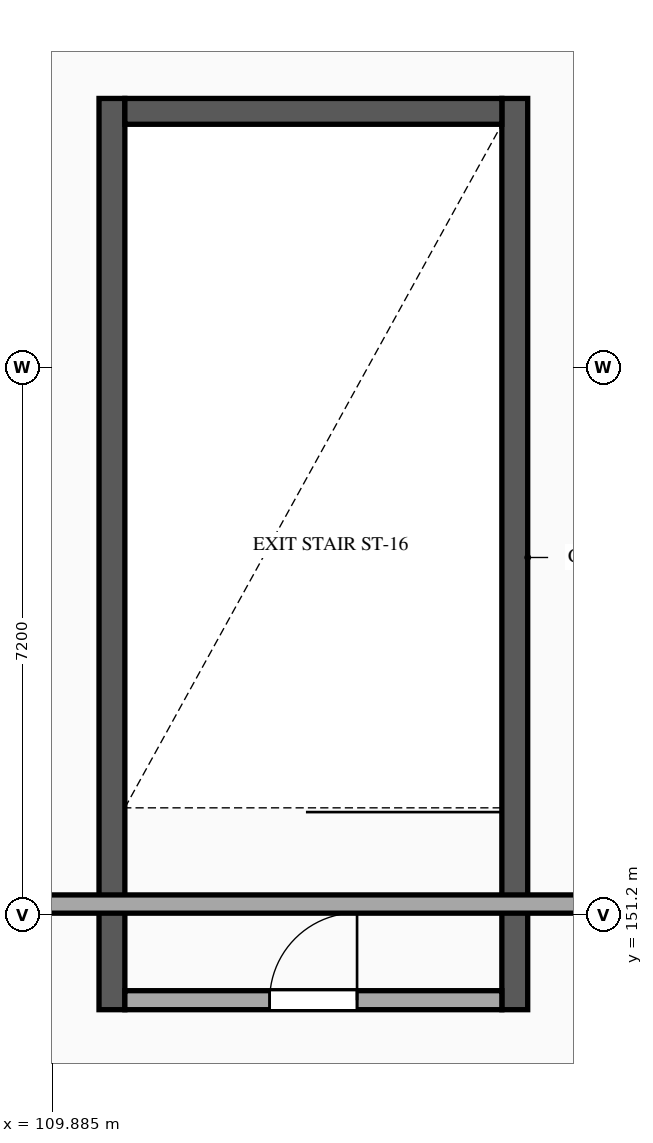
"""IFC4 building model, lengths in metres.
Left out: names, types, materials, properties, quantities, classifications, styles, units other than length and angle.
Written with IfcOpenShell. Run it as: python <this file> out.ifc"""

import sys

from ifc_helpers import new_model, si_unit, direction, frame, frame_2d, origin, place, context, subcontext, project, spatial, rectangle, extrude, element, fill, save


model = new_model("IFC4")
c1 = context("Model", 3, precision=1e-05, world=origin(), true_north=direction((0.0, 1.0)))
c2 = subcontext(c1, "Body", "Model", "MODEL_VIEW")
j1 = project(units=[si_unit("LENGTHUNIT", "METRE"), si_unit("PLANEANGLEUNIT", "RADIAN")], contexts=[c1])
p1 = place(None, origin())
s1 = spatial("IfcSite", under=j1, at=p1, CompositionType="ELEMENT")
p2 = place(p1, origin())
s2 = spatial("IfcBuilding", under=s1, at=p2, CompositionType="ELEMENT")
p3 = place(p2, frame((0.0, 0.0, 15.3)))
s3 = spatial("IfcBuildingStorey", under=s2, at=p3, CompositionType="ELEMENT", Elevation=15.3)
for number, where, z_axis, x_axis in (
    (1, (110.67, 149.95, 0.0), (0.0, 0.0, 1.0), (0.0, 1.0, 0.0)),
    (2, (115.97, 161.94, 0.0), (0.0, 0.0, 1.0), (0.0, -1.0, 0.0)),
):
    element("IfcWall", number, at=place(p3, frame(where, z_axis=z_axis, x_axis=x_axis)), inside=s3, PredefinedType="SHEAR", context=c2, shape_type="SweptSolid", body=[
        extrude(rectangle(XDim=11.99, YDim=0.34, at=frame_2d((5.995, 0.0))), origin(), (0.0, 0.0, 1.0), 4.2),
    ])
p4 = place(p3, frame((110.84, 161.77, 0.0), z_axis=(0.0, 0.0, 1.0), x_axis=(1.0, 0.0, 0.0)))
e3 = element("IfcWall", 3, at=p4, inside=s3, PredefinedType="SHEAR", context=c2, shape_type="SweptSolid", body=[
    extrude(rectangle(XDim=4.96, YDim=0.34, at=frame_2d((2.48, 0.0))), origin(), (0.0, 0.0, 1.0), 4.2),
])
p5 = place(p3, frame((135.0, 151.34, 4.5), z_axis=(0.0, 0.0, 1.0), x_axis=(-1.0, 0.0, 0.0)))
e4 = element("IfcWall", 4, at=p5, inside=s3, PredefinedType="PARAPET", context=c2, shape_type="SweptSolid", body=[
    extrude(rectangle(XDim=35.86, YDim=0.24, at=frame_2d((17.93, 0.0))), origin(), (0.0, 0.0, 1.0), 0.65),
])
p6 = place(p3, frame((110.84, 150.075, 0.0), z_axis=(0.0, 0.0, 1.0), x_axis=(1.0, 0.0, 0.0)))
e5 = element("IfcWall", 5, at=p6, inside=s3, PredefinedType="STANDARD", context=c2, shape_type="SweptSolid", body=[
    extrude(rectangle(XDim=4.96, YDim=0.25, at=frame_2d((2.48, 0.0))), origin(), (0.0, 0.0, 1.0), 4.2),
])
p7 = place(p6, frame((1.905, 0.0, 0.0)))
e6 = element("IfcOpeningElement", 6, at=p7, cuts=e5, PredefinedType="OPENING", context=c2, shape_type="SweptSolid", body=[
    extrude(rectangle(XDim=1.15, YDim=2.2, at=frame_2d((0.575, 1.1))), frame((0.0, 0.135, 0.0), z_axis=(0.0, -1.0, 0.0), x_axis=(1.0, 0.0, 0.0)), (0.0, 0.0, 1.0), 0.27),
])
p8 = place(p7, origin())
e7 = element("IfcDoor", 7, at=p8, inside=s3, OperationType="SINGLE_SWING_RIGHT", PredefinedType="DOOR", context=c2, shape_type="SweptSolid", body=[
    extrude(rectangle(XDim=1.15, YDim=2.2, at=frame_2d((0.575, 1.1))), frame((0.0, 0.025, 0.0), z_axis=(0.0, -1.0, 0.0), x_axis=(1.0, 0.0, 0.0)), (0.0, 0.0, 1.0), 0.05),
])
fill(e6, e7)
save(model, sys.argv[1])
